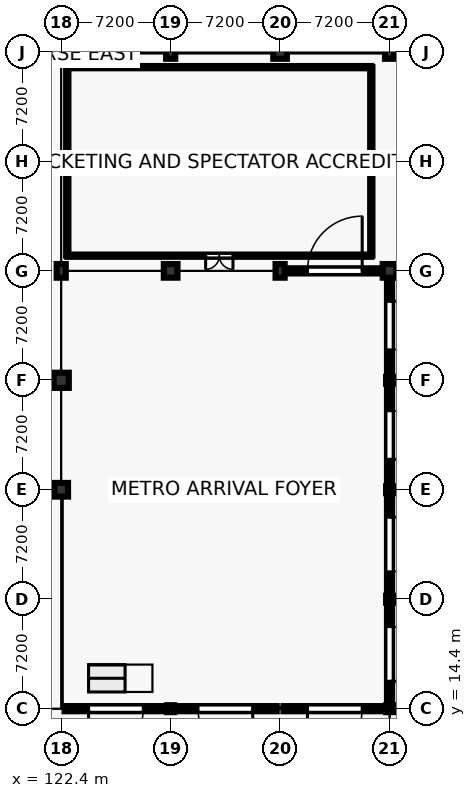
"""IFC4 building model, lengths in metres.
Left out: names, types, materials, properties, quantities, classifications, styles, units other than length and angle.
Written with IfcOpenShell. Run it as: python <this file> out.ifc"""

import sys

from ifc_helpers import new_model, si_unit, direction, frame, frame_2d, origin, origin_2d, place, context, subcontext, project, spatial, rectangle, circle, hollow_circle, extrude, element, fill, save


model = new_model("IFC4")
c1 = context("Model", 3, precision=1e-05, world=origin(), true_north=direction((0.0, 1.0)))
c2 = subcontext(c1, "Body", "Model", "MODEL_VIEW")
j1 = project(units=[si_unit("LENGTHUNIT", "METRE"), si_unit("PLANEANGLEUNIT", "RADIAN")], contexts=[c1])
p1 = place(None, origin())
s1 = spatial("IfcSite", under=j1, at=p1, CompositionType="ELEMENT")
p2 = place(p1, origin())
s2 = spatial("IfcBuilding", under=s1, at=p2, CompositionType="ELEMENT")
p3 = place(p2, origin())
s3 = spatial("IfcBuildingStorey", under=s2, at=p3, CompositionType="ELEMENT", Elevation=0.0)
p4 = place(p3, frame((122.4, 28.8, 0.0), z_axis=(0.0, 0.0, 1.0), x_axis=(1.0, 0.0, 0.0)))
e1 = element("IfcColumn", 1, at=p4, inside=s3, PredefinedType="COLUMN", context=c2, shape_type="SweptSolid", body=[
    extrude(rectangle(XDim=0.9, YDim=0.9, at=origin_2d()), origin(), (0.0, 0.0, 1.0), 5.4),
])
p5 = place(p3, frame((122.4, 36.0, 0.0), z_axis=(0.0, 0.0, 1.0), x_axis=(1.0, 0.0, 0.0)))
e2 = element("IfcColumn", 2, at=p5, inside=s3, PredefinedType="COLUMN", context=c2, shape_type="SweptSolid", body=[
    extrude(circle(Radius=0.5, at=origin_2d()), origin(), (0.0, 0.0, 1.0), 5.4),
])
p6 = place(p3, frame((122.4, 43.2, 0.0), z_axis=(0.0, 0.0, 1.0), x_axis=(1.0, 0.0, 0.0)))
e3 = element("IfcColumn", 3, at=p6, inside=s3, PredefinedType="COLUMN", context=c2, shape_type="SweptSolid", body=[
    extrude(rectangle(XDim=0.6, YDim=0.9, at=origin_2d()), origin(), (0.0, 0.0, 1.0), 5.4),
])
p7 = place(p3, frame((122.4, 50.4, 0.0), z_axis=(0.0, 0.0, 1.0), x_axis=(1.0, 0.0, 0.0)))
e4 = element("IfcColumn", 4, at=p7, inside=s3, PredefinedType="COLUMN", context=c2, shape_type="SweptSolid", body=[
    extrude(rectangle(XDim=1.0, YDim=1.0, at=origin_2d()), origin(), (0.0, 0.0, 1.0), 5.4),
])
p8 = place(p3, frame((122.4, 57.6, 0.0), z_axis=(0.0, 0.0, 1.0), x_axis=(1.0, 0.0, 0.0)))
e5 = element("IfcColumn", 5, at=p8, inside=s3, PredefinedType="COLUMN", context=c2, shape_type="SweptSolid", body=[
    extrude(rectangle(XDim=0.9, YDim=0.9, at=origin_2d()), origin(), (0.0, 0.0, 1.0), 5.4),
])
p9 = place(p3, frame((129.6, 14.4, 0.0), z_axis=(0.0, 0.0, 1.0), x_axis=(1.0, 0.0, 0.0)))
e6 = element("IfcColumn", 6, at=p9, inside=s3, PredefinedType="COLUMN", context=c2, shape_type="SweptSolid", body=[
    extrude(hollow_circle(Radius=0.229, WallThickness=0.02, at=origin_2d()), origin(), (0.0, 0.0, 1.0), 5.4),
])
p10 = place(p3, frame((129.6, 43.2, 0.0), z_axis=(0.0, 0.0, 1.0), x_axis=(1.0, 0.0, 0.0)))
e7 = element("IfcColumn", 7, at=p10, inside=s3, PredefinedType="COLUMN", context=c2, shape_type="SweptSolid", body=[
    extrude(rectangle(XDim=0.9, YDim=0.9, at=origin_2d()), origin(), (0.0, 0.0, 1.0), 5.4),
])
p11 = place(p3, frame((129.6, 50.4, 0.0), z_axis=(0.0, 0.0, 1.0), x_axis=(1.0, 0.0, 0.0)))
e8 = element("IfcColumn", 8, at=p11, inside=s3, PredefinedType="COLUMN", context=c2, shape_type="SweptSolid", body=[
    extrude(circle(Radius=0.5, at=origin_2d()), origin(), (0.0, 0.0, 1.0), 5.4),
])
for number, where, z_axis, x_axis in (
    (9, (129.6, 57.6, 0.0), (0.0, 0.0, 1.0), (1.0, 0.0, 0.0)),
    (10, (136.8, 43.2, 0.0), (0.0, 0.0, 1.0), (1.0, 0.0, 0.0)),
):
    element("IfcColumn", number, at=place(p3, frame(where, z_axis=z_axis, x_axis=x_axis)), inside=s3, PredefinedType="COLUMN", context=c2, shape_type="SweptSolid", body=[
        extrude(rectangle(XDim=0.6, YDim=0.9, at=origin_2d()), origin(), (0.0, 0.0, 1.0), 5.4),
    ])
p12 = place(p3, frame((136.8, 50.4, 0.0), z_axis=(0.0, 0.0, 1.0), x_axis=(1.0, 0.0, 0.0)))
e11 = element("IfcColumn", 11, at=p12, inside=s3, PredefinedType="COLUMN", context=c2, shape_type="SweptSolid", body=[
    extrude(rectangle(XDim=1.0, YDim=1.0, at=origin_2d()), origin(), (0.0, 0.0, 1.0), 5.4),
])
p13 = place(p3, frame((136.8, 57.6, 0.0), z_axis=(0.0, 0.0, 1.0), x_axis=(1.0, 0.0, 0.0)))
e12 = element("IfcColumn", 12, at=p13, inside=s3, PredefinedType="COLUMN", context=c2, shape_type="SweptSolid", body=[
    extrude(rectangle(XDim=0.9, YDim=0.9, at=origin_2d()), origin(), (0.0, 0.0, 1.0), 5.4),
])
for number, where, z_axis, x_axis in (
    (13, (144.0, 14.4, 0.0), (0.0, 0.0, 1.0), (1.0, 0.0, 0.0)),
    (14, (144.0, 21.6, 0.0), (0.0, 0.0, 1.0), (1.0, 0.0, 0.0)),
    (15, (144.0, 28.8, 0.0), (0.0, 0.0, 1.0), (1.0, 0.0, 0.0)),
    (16, (144.0, 36.0, 0.0), (0.0, 0.0, 1.0), (1.0, 0.0, 0.0)),
):
    element("IfcColumn", number, at=place(p3, frame(where, z_axis=z_axis, x_axis=x_axis)), inside=s3, PredefinedType="COLUMN", context=c2, shape_type="SweptSolid", body=[
        extrude(hollow_circle(Radius=0.229, WallThickness=0.02, at=origin_2d()), origin(), (0.0, 0.0, 1.0), 5.4),
    ])
p14 = place(p3, frame((144.0, 43.2, 0.0), z_axis=(0.0, 0.0, 1.0), x_axis=(1.0, 0.0, 0.0)))
e17 = element("IfcColumn", 17, at=p14, inside=s3, PredefinedType="COLUMN", context=c2, shape_type="SweptSolid", body=[
    extrude(rectangle(XDim=0.9, YDim=0.9, at=origin_2d()), origin(), (0.0, 0.0, 1.0), 5.4),
])
p15 = place(p3, frame((144.0, 50.4, 0.0), z_axis=(0.0, 0.0, 1.0), x_axis=(1.0, 0.0, 0.0)))
e18 = element("IfcColumn", 18, at=p15, inside=s3, PredefinedType="COLUMN", context=c2, shape_type="SweptSolid", body=[
    extrude(circle(Radius=0.5, at=origin_2d()), origin(), (0.0, 0.0, 1.0), 5.4),
])
p16 = place(p3, frame((144.0, 57.6, 0.0), z_axis=(0.0, 0.0, 1.0), x_axis=(1.0, 0.0, 0.0)))
e19 = element("IfcColumn", 19, at=p16, inside=s3, PredefinedType="COLUMN", context=c2, shape_type="SweptSolid", body=[
    extrude(rectangle(XDim=0.6, YDim=0.9, at=origin_2d()), origin(), (0.0, 0.0, 1.0), 5.4),
])
p17 = place(p3, frame((122.62, 14.4, 0.0), z_axis=(0.0, 0.0, 1.0), x_axis=(1.0, 0.0, 0.0)))
e20 = element("IfcWall", 20, at=p17, inside=s3, PredefinedType="SOLIDWALL", context=c2, shape_type="SweptSolid", body=[
    extrude(rectangle(XDim=6.76, YDim=0.34, at=frame_2d((3.38, 0.0))), origin(), (0.0, 0.0, 1.0), 4.1),
])
p18 = place(p17, frame((1.58, 0.0, 0.0)))
e21 = element("IfcOpeningElement", 21, at=p18, cuts=e20, PredefinedType="OPENING", context=c2, shape_type="SweptSolid", body=[
    extrude(rectangle(XDim=3.6, YDim=2.8, at=frame_2d((1.8, 1.4))), frame((0.0, 0.18, 0.0), z_axis=(0.0, -1.0, 0.0), x_axis=(1.0, 0.0, 0.0)), (0.0, 0.0, 1.0), 0.36),
])
p19 = place(p3, frame((129.82, 14.4, 0.0), z_axis=(0.0, 0.0, 1.0), x_axis=(1.0, 0.0, 0.0)))
e22 = element("IfcWall", 22, at=p19, inside=s3, PredefinedType="SOLIDWALL", context=c2, shape_type="SweptSolid", body=[
    extrude(rectangle(XDim=6.76, YDim=0.34, at=frame_2d((3.38, 0.0))), origin(), (0.0, 0.0, 1.0), 4.1),
])
p20 = place(p19, frame((1.58, 0.0, 0.0)))
e23 = element("IfcOpeningElement", 23, at=p20, cuts=e22, PredefinedType="OPENING", context=c2, shape_type="SweptSolid", body=[
    extrude(rectangle(XDim=3.6, YDim=2.8, at=frame_2d((1.8, 1.4))), frame((0.0, 0.18, 0.0), z_axis=(0.0, -1.0, 0.0), x_axis=(1.0, 0.0, 0.0)), (0.0, 0.0, 1.0), 0.36),
])
p21 = place(p3, frame((137.02, 14.4, 0.0), z_axis=(0.0, 0.0, 1.0), x_axis=(1.0, 0.0, 0.0)))
e24 = element("IfcWall", 24, at=p21, inside=s3, PredefinedType="SOLIDWALL", context=c2, shape_type="SweptSolid", body=[
    extrude(rectangle(XDim=6.76, YDim=0.34, at=frame_2d((3.38, 0.0))), origin(), (0.0, 0.0, 1.0), 4.1),
])
p22 = place(p21, frame((1.58, 0.0, 0.0)))
e25 = element("IfcOpeningElement", 25, at=p22, cuts=e24, PredefinedType="OPENING", context=c2, shape_type="SweptSolid", body=[
    extrude(rectangle(XDim=3.6, YDim=2.8, at=frame_2d((1.8, 1.4))), frame((0.0, 0.18, 0.0), z_axis=(0.0, -1.0, 0.0), x_axis=(1.0, 0.0, 0.0)), (0.0, 0.0, 1.0), 0.36),
])
p23 = place(p3, frame((137.02, 43.2, 0.0), z_axis=(0.0, 0.0, 1.0), x_axis=(1.0, 0.0, 0.0)))
e26 = element("IfcWall", 26, at=p23, inside=s3, PredefinedType="SOLIDWALL", context=c2, shape_type="SweptSolid", body=[
    extrude(rectangle(XDim=6.76, YDim=0.34, at=frame_2d((3.38, 0.0))), origin(), (0.0, 0.0, 1.0), 4.1),
])
p24 = place(p23, frame((1.58, 0.0, 0.0)))
e27 = element("IfcOpeningElement", 27, at=p24, cuts=e26, PredefinedType="OPENING", context=c2, shape_type="SweptSolid", body=[
    extrude(rectangle(XDim=3.6, YDim=2.8, at=frame_2d((1.8, 1.4))), frame((0.0, 0.18, 0.0), z_axis=(0.0, -1.0, 0.0), x_axis=(1.0, 0.0, 0.0)), (0.0, 0.0, 1.0), 0.36),
])
p25 = place(p3, frame((144.0, 14.62, 0.0), z_axis=(0.0, 0.0, 1.0), x_axis=(0.0, 1.0, 0.0)))
e28 = element("IfcWall", 28, at=p25, inside=s3, PredefinedType="SOLIDWALL", context=c2, shape_type="SweptSolid", body=[
    extrude(rectangle(XDim=6.76, YDim=0.34, at=frame_2d((3.38, 0.0))), origin(), (0.0, 0.0, 1.0), 4.1),
])
p26 = place(p25, frame((1.58, 0.0, 0.0)))
e29 = element("IfcOpeningElement", 29, at=p26, cuts=e28, PredefinedType="OPENING", context=c2, shape_type="SweptSolid", body=[
    extrude(rectangle(XDim=3.6, YDim=2.8, at=frame_2d((1.8, 1.4))), frame((0.0, 0.18, 0.0), z_axis=(0.0, -1.0, 0.0), x_axis=(1.0, 0.0, 0.0)), (0.0, 0.0, 1.0), 0.36),
])
p27 = place(p3, frame((144.0, 21.82, 0.0), z_axis=(0.0, 0.0, 1.0), x_axis=(0.0, 1.0, 0.0)))
e30 = element("IfcWall", 30, at=p27, inside=s3, PredefinedType="SOLIDWALL", context=c2, shape_type="SweptSolid", body=[
    extrude(rectangle(XDim=6.76, YDim=0.34, at=frame_2d((3.38, 0.0))), origin(), (0.0, 0.0, 1.0), 4.1),
])
p28 = place(p27, frame((1.58, 0.0, 0.0)))
e31 = element("IfcOpeningElement", 31, at=p28, cuts=e30, PredefinedType="OPENING", context=c2, shape_type="SweptSolid", body=[
    extrude(rectangle(XDim=3.6, YDim=2.8, at=frame_2d((1.8, 1.4))), frame((0.0, 0.18, 0.0), z_axis=(0.0, -1.0, 0.0), x_axis=(1.0, 0.0, 0.0)), (0.0, 0.0, 1.0), 0.36),
])
p29 = place(p3, frame((144.0, 29.02, 0.0), z_axis=(0.0, 0.0, 1.0), x_axis=(0.0, 1.0, 0.0)))
e32 = element("IfcWall", 32, at=p29, inside=s3, PredefinedType="SOLIDWALL", context=c2, shape_type="SweptSolid", body=[
    extrude(rectangle(XDim=6.76, YDim=0.34, at=frame_2d((3.38, 0.0))), origin(), (0.0, 0.0, 1.0), 4.1),
])
p30 = place(p29, frame((1.78, 0.0, 0.0)))
e33 = element("IfcOpeningElement", 33, at=p30, cuts=e32, PredefinedType="OPENING", context=c2, shape_type="SweptSolid", body=[
    extrude(rectangle(XDim=3.2, YDim=2.75, at=frame_2d((1.6, 1.375))), frame((0.0, 0.18, 0.0), z_axis=(0.0, -1.0, 0.0), x_axis=(1.0, 0.0, 0.0)), (0.0, 0.0, 1.0), 0.36),
])
p31 = place(p3, frame((144.0, 36.22, 0.0), z_axis=(0.0, 0.0, 1.0), x_axis=(0.0, 1.0, 0.0)))
e34 = element("IfcWall", 34, at=p31, inside=s3, PredefinedType="SOLIDWALL", context=c2, shape_type="SweptSolid", body=[
    extrude(rectangle(XDim=6.76, YDim=0.34, at=frame_2d((3.38, 0.0))), origin(), (0.0, 0.0, 1.0), 4.1),
])
p32 = place(p31, frame((1.78, 0.0, 0.0)))
e35 = element("IfcOpeningElement", 35, at=p32, cuts=e34, PredefinedType="OPENING", context=c2, shape_type="SweptSolid", body=[
    extrude(rectangle(XDim=3.2, YDim=2.75, at=frame_2d((1.6, 1.375))), frame((0.0, 0.18, 0.0), z_axis=(0.0, -1.0, 0.0), x_axis=(1.0, 0.0, 0.0)), (0.0, 0.0, 1.0), 0.36),
])
p33 = place(p3, frame((115.55, 28.8, 0.0), z_axis=(0.0, 0.0, 1.0), x_axis=(1.0, 0.0, 0.0)))
e36 = element("IfcWall", 36, at=p33, inside=s3, PredefinedType="SOLIDWALL", context=c2, shape_type="SweptSolid", body=[
    extrude(rectangle(XDim=6.5, YDim=0.29, at=frame_2d((3.25, 0.0))), origin(), (0.0, 0.0, 1.0), 4.1),
])
p34 = place(p33, frame((2.25, 0.0, 0.0)))
e37 = element("IfcOpeningElement", 37, at=p34, cuts=e36, PredefinedType="OPENING", context=c2, shape_type="SweptSolid", body=[
    extrude(rectangle(XDim=2.0, YDim=2.45, at=frame_2d((1.0, 1.225))), frame((0.0, 0.155, 0.0), z_axis=(0.0, -1.0, 0.0), x_axis=(1.0, 0.0, 0.0)), (0.0, 0.0, 1.0), 0.31),
])
p35 = place(p3, frame((122.8, 44.2, 0.0), z_axis=(0.0, 0.0, 1.0), x_axis=(1.0, 0.0, 0.0)))
e38 = element("IfcWall", 38, at=p35, inside=s3, PredefinedType="PARTITIONING", context=c2, shape_type="SweptSolid", body=[
    extrude(rectangle(XDim=20.0, YDim=0.15, at=frame_2d((10.0, 0.0))), origin(), (0.0, 0.0, 1.0), 4.1),
])
p36 = place(p35, frame((9.1, 0.0, 0.0)))
e39 = element("IfcOpeningElement", 39, at=p36, cuts=e38, PredefinedType="OPENING", context=c2, shape_type="SweptSolid", body=[
    extrude(rectangle(XDim=1.8, YDim=2.3, at=frame_2d((0.9, 1.15))), frame((0.0, 0.085, 0.0), z_axis=(0.0, -1.0, 0.0), x_axis=(1.0, 0.0, 0.0)), (0.0, 0.0, 1.0), 0.17),
])
p37 = place(p3, frame((142.8, 44.2, 0.0), z_axis=(0.0, 0.0, 1.0), x_axis=(0.0, 1.0, 0.0)))
e40 = element("IfcWall", 40, at=p37, inside=s3, PredefinedType="PARTITIONING", context=c2, shape_type="SweptSolid", body=[
    extrude(rectangle(XDim=12.4, YDim=0.15, at=frame_2d((6.2, 0.0))), origin(), (0.0, 0.0, 1.0), 4.1),
])
p38 = place(p3, frame((142.8, 56.6, 0.0), z_axis=(0.0, 0.0, 1.0), x_axis=(-1.0, 0.0, 0.0)))
e41 = element("IfcWall", 41, at=p38, inside=s3, PredefinedType="PARTITIONING", context=c2, shape_type="SweptSolid", body=[
    extrude(rectangle(XDim=20.0, YDim=0.15, at=frame_2d((10.0, 0.0))), origin(), (0.0, 0.0, 1.0), 4.1),
])
p39 = place(p3, frame((122.8, 56.6, 0.0), z_axis=(0.0, 0.0, 1.0), x_axis=(0.0, -1.0, 0.0)))
e42 = element("IfcWall", 42, at=p39, inside=s3, PredefinedType="PARTITIONING", context=c2, shape_type="SweptSolid", body=[
    extrude(rectangle(XDim=12.4, YDim=0.15, at=frame_2d((6.2, 0.0))), origin(), (0.0, 0.0, 1.0), 4.1),
])
p40 = place(p18, frame((3.6, 0.0, 0.0), z_axis=(0.0, 0.0, 1.0), x_axis=(-1.0, 0.0, 0.0)))
e43 = element("IfcDoor", 43, at=p40, inside=s3, OperationType="SINGLE_SWING_LEFT", PredefinedType="DOOR", context=c2, shape_type="SweptSolid", body=[
    extrude(rectangle(XDim=3.6, YDim=2.8, at=frame_2d((1.8, 1.4))), frame((0.0, 0.025, 0.0), z_axis=(0.0, -1.0, 0.0), x_axis=(1.0, 0.0, 0.0)), (0.0, 0.0, 1.0), 0.05),
])
fill(e21, e43)
p41 = place(p20, frame((3.6, 0.0, 0.0), z_axis=(0.0, 0.0, 1.0), x_axis=(-1.0, 0.0, 0.0)))
e44 = element("IfcDoor", 44, at=p41, inside=s3, OperationType="SINGLE_SWING_RIGHT", PredefinedType="DOOR", context=c2, shape_type="SweptSolid", body=[
    extrude(rectangle(XDim=3.6, YDim=2.8, at=frame_2d((1.8, 1.4))), frame((0.0, 0.025, 0.0), z_axis=(0.0, -1.0, 0.0), x_axis=(1.0, 0.0, 0.0)), (0.0, 0.0, 1.0), 0.05),
])
fill(e23, e44)
p42 = place(p22, frame((3.6, 0.0, 0.0), z_axis=(0.0, 0.0, 1.0), x_axis=(-1.0, 0.0, 0.0)))
e45 = element("IfcDoor", 45, at=p42, inside=s3, OperationType="SINGLE_SWING_LEFT", PredefinedType="DOOR", context=c2, shape_type="SweptSolid", body=[
    extrude(rectangle(XDim=3.6, YDim=2.8, at=frame_2d((1.8, 1.4))), frame((0.0, 0.025, 0.0), z_axis=(0.0, -1.0, 0.0), x_axis=(1.0, 0.0, 0.0)), (0.0, 0.0, 1.0), 0.05),
])
fill(e25, e45)
p43 = place(p24, origin())
e46 = element("IfcDoor", 46, at=p43, inside=s3, OperationType="SINGLE_SWING_RIGHT", PredefinedType="DOOR", context=c2, shape_type="SweptSolid", body=[
    extrude(rectangle(XDim=3.6, YDim=2.8, at=frame_2d((1.8, 1.4))), frame((0.0, 0.025, 0.0), z_axis=(0.0, -1.0, 0.0), x_axis=(1.0, 0.0, 0.0)), (0.0, 0.0, 1.0), 0.05),
])
fill(e27, e46)
p44 = place(p26, frame((3.6, 0.0, 0.0), z_axis=(0.0, 0.0, 1.0), x_axis=(-1.0, 0.0, 0.0)))
e47 = element("IfcDoor", 47, at=p44, inside=s3, OperationType="SINGLE_SWING_LEFT", PredefinedType="DOOR", context=c2, shape_type="SweptSolid", body=[
    extrude(rectangle(XDim=3.6, YDim=2.8, at=frame_2d((1.8, 1.4))), frame((0.0, 0.025, 0.0), z_axis=(0.0, -1.0, 0.0), x_axis=(1.0, 0.0, 0.0)), (0.0, 0.0, 1.0), 0.05),
])
fill(e29, e47)
p45 = place(p28, frame((3.6, 0.0, 0.0), z_axis=(0.0, 0.0, 1.0), x_axis=(-1.0, 0.0, 0.0)))
e48 = element("IfcDoor", 48, at=p45, inside=s3, OperationType="SINGLE_SWING_RIGHT", PredefinedType="DOOR", context=c2, shape_type="SweptSolid", body=[
    extrude(rectangle(XDim=3.6, YDim=2.8, at=frame_2d((1.8, 1.4))), frame((0.0, 0.025, 0.0), z_axis=(0.0, -1.0, 0.0), x_axis=(1.0, 0.0, 0.0)), (0.0, 0.0, 1.0), 0.05),
])
fill(e31, e48)
p46 = place(p30, frame((3.2, 0.0, 0.0), z_axis=(0.0, 0.0, 1.0), x_axis=(-1.0, 0.0, 0.0)))
e49 = element("IfcDoor", 49, at=p46, inside=s3, OperationType="SINGLE_SWING_LEFT", PredefinedType="DOOR", context=c2, shape_type="SweptSolid", body=[
    extrude(rectangle(XDim=3.2, YDim=2.75, at=frame_2d((1.6, 1.375))), frame((0.0, 0.025, 0.0), z_axis=(0.0, -1.0, 0.0), x_axis=(1.0, 0.0, 0.0)), (0.0, 0.0, 1.0), 0.05),
])
fill(e33, e49)
p47 = place(p32, frame((3.2, 0.0, 0.0), z_axis=(0.0, 0.0, 1.0), x_axis=(-1.0, 0.0, 0.0)))
e50 = element("IfcDoor", 50, at=p47, inside=s3, OperationType="SINGLE_SWING_RIGHT", PredefinedType="DOOR", context=c2, shape_type="SweptSolid", body=[
    extrude(rectangle(XDim=3.2, YDim=2.75, at=frame_2d((1.6, 1.375))), frame((0.0, 0.025, 0.0), z_axis=(0.0, -1.0, 0.0), x_axis=(1.0, 0.0, 0.0)), (0.0, 0.0, 1.0), 0.05),
])
fill(e35, e50)
p48 = place(p36, frame((1.8, 0.0, 0.0), z_axis=(0.0, 0.0, 1.0), x_axis=(-1.0, 0.0, 0.0)))
e51 = element("IfcDoor", 51, at=p48, inside=s3, OperationType="DOUBLE_DOOR_SINGLE_SWING", PredefinedType="DOOR", context=c2, shape_type="SweptSolid", body=[
    extrude(rectangle(XDim=1.8, YDim=2.3, at=frame_2d((0.9, 1.15))), frame((0.0, 0.025, 0.0), z_axis=(0.0, -1.0, 0.0), x_axis=(1.0, 0.0, 0.0)), (0.0, 0.0, 1.0), 0.05),
])
fill(e39, e51)
save(model, sys.argv[1])
